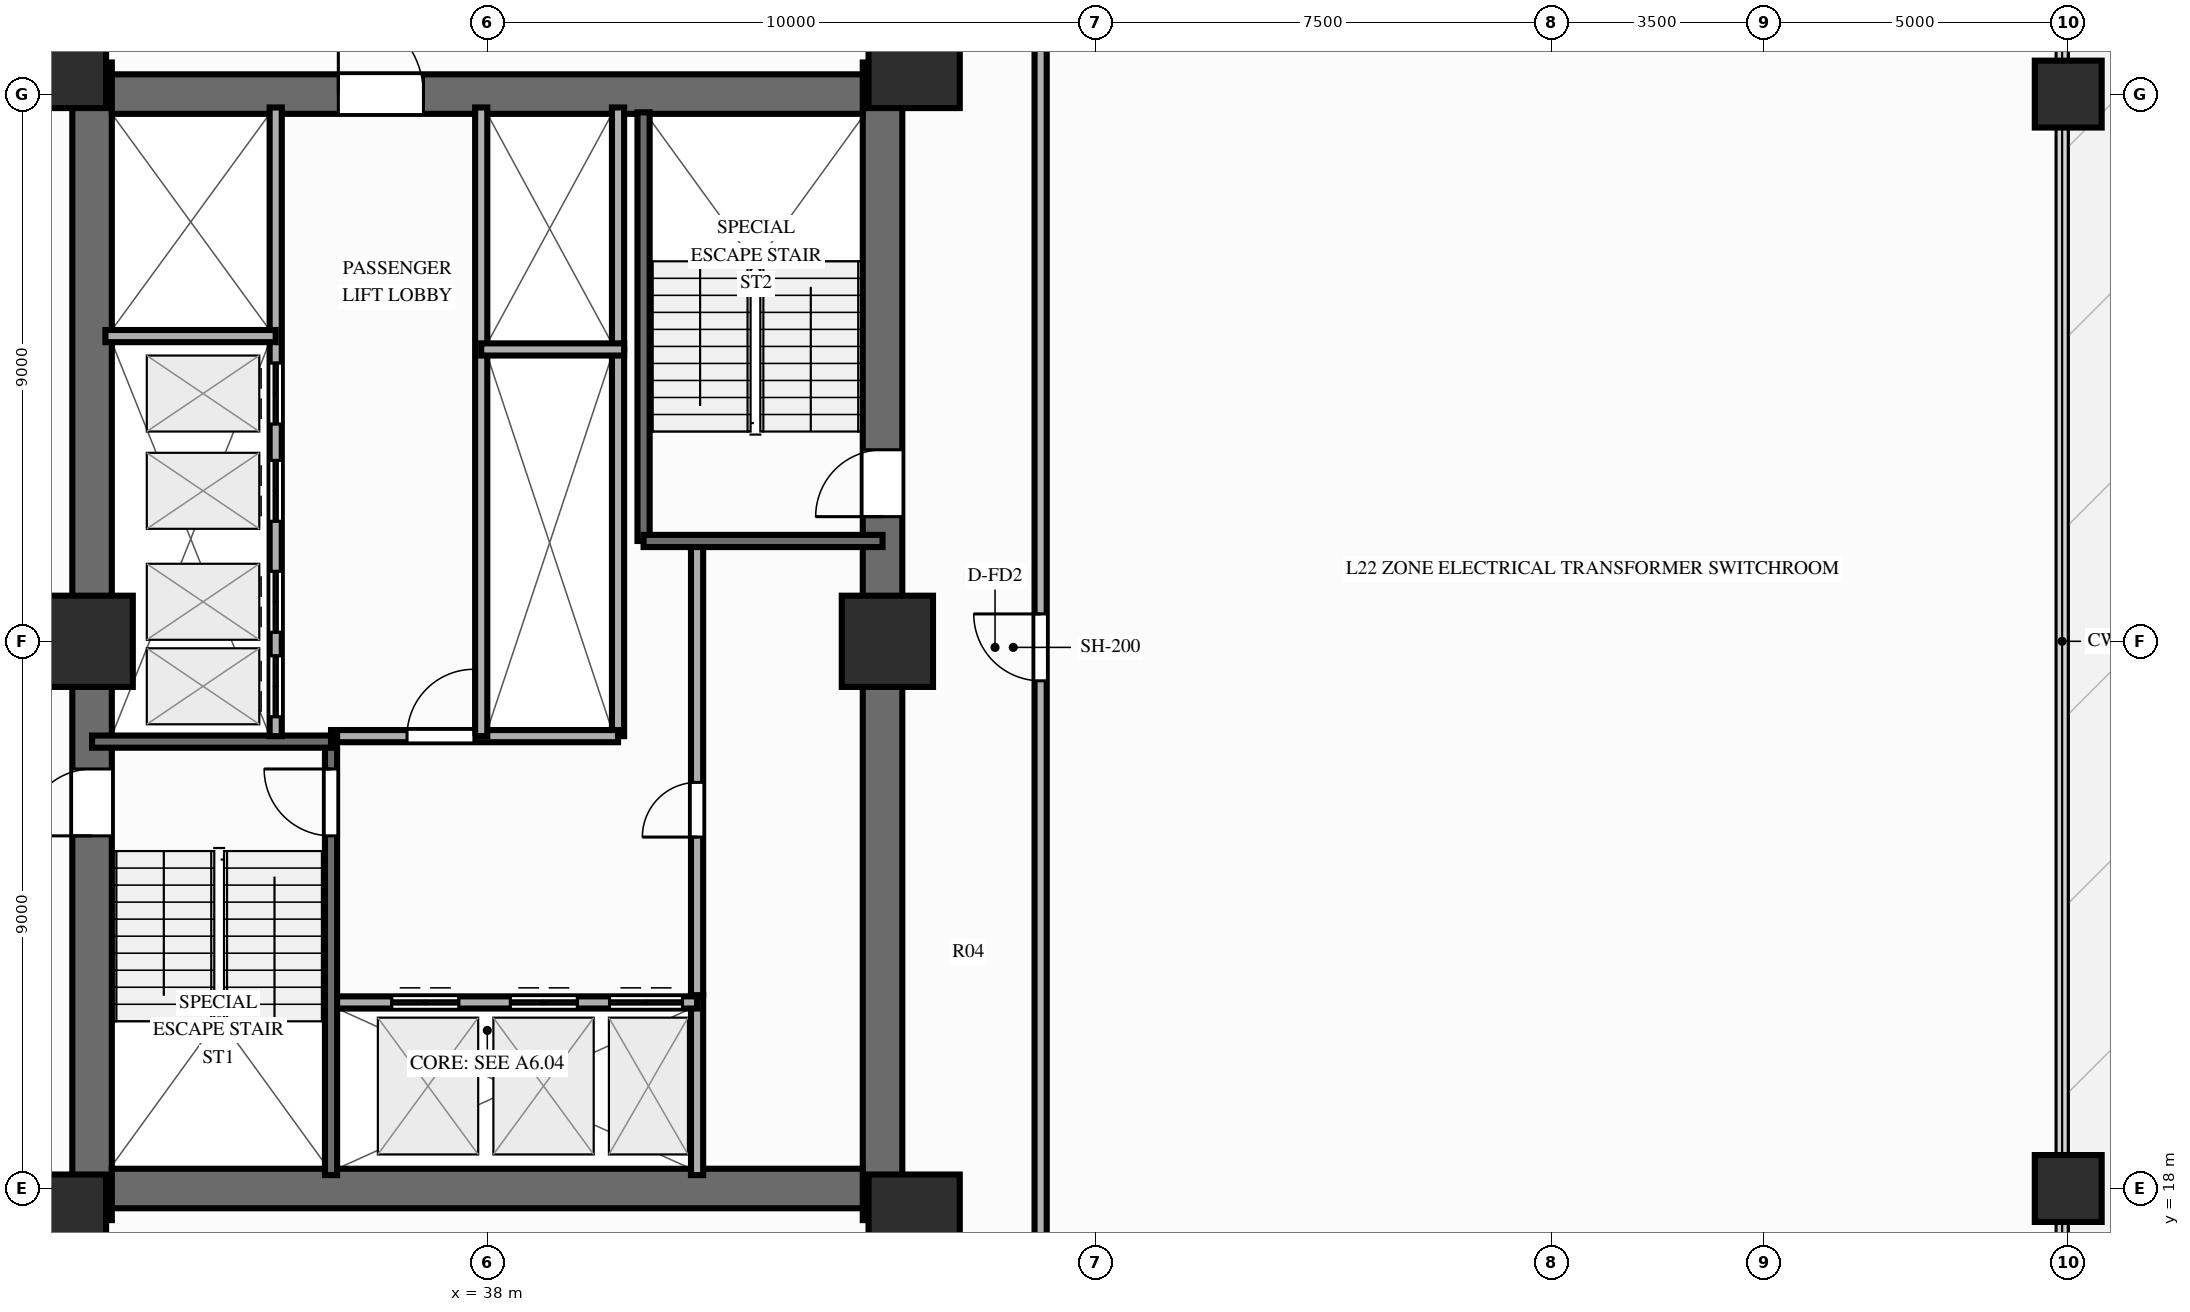
"""IFC4 building model, lengths in metres.
Left out: names, types, materials, properties, quantities, classifications, styles, units other than length and angle.
Written with IfcOpenShell. Run it as: python <this file> out.ifc"""

import sys

from ifc_helpers import new_model, si_unit, direction, frame, frame_2d, origin, origin_2d, place, context, subcontext, project, spatial, rectangle, extrude, source, transform, mapped, element, fill, save


model = new_model("IFC4")
c1 = context("Model", 3, precision=1e-05, world=origin(), true_north=direction((0.0, 1.0)))
c2 = subcontext(c1, "Body", "Model", "MODEL_VIEW")
j1 = project(units=[si_unit("LENGTHUNIT", "METRE"), si_unit("PLANEANGLEUNIT", "RADIAN")], contexts=[c1])
p1 = place(None, origin())
s1 = spatial("IfcSite", under=j1, at=p1, CompositionType="ELEMENT")
p2 = place(p1, origin())
s2 = spatial("IfcBuilding", under=s1, at=p2, CompositionType="ELEMENT")
p3 = place(p2, frame((0.0, 0.0, 70.4)))
s3 = spatial("IfcBuildingStorey", under=s2, at=p3, CompositionType="ELEMENT", Elevation=70.4)
p4 = place(p3, frame((31.5, 17.48, 0.0), z_axis=(0.0, 0.0, 1.0), x_axis=(0.0, 1.0, 0.0)))
e1 = element("IfcWall", 1, at=p4, inside=s3, PredefinedType="SHEAR", context=c2, shape_type="SweptSolid", body=[
    extrude(rectangle(XDim=19.04, YDim=0.65, at=frame_2d((9.52, 0.0))), origin(), (0.0, 0.0, 1.0), 3.95),
])
p5 = place(p4, frame((6.32, 0.0, 0.0)))
e2 = element("IfcOpeningElement", 2, at=p5, cuts=e1, PredefinedType="OPENING", context=c2, shape_type="SweptSolid", body=[
    extrude(rectangle(XDim=1.1, YDim=2.15, at=frame_2d((0.55, 1.075))), frame((0.0, 0.337, 0.0), z_axis=(0.0, -1.0, 0.0), x_axis=(1.0, 0.0, 0.0)), (0.0, 0.0, 1.0), 0.674),
])
p6 = place(p3, frame((44.5, 17.48, 0.0), z_axis=(0.0, 0.0, 1.0), x_axis=(0.0, 1.0, 0.0)))
e3 = element("IfcWall", 3, at=p6, inside=s3, PredefinedType="SHEAR", context=c2, shape_type="SweptSolid", body=[
    extrude(rectangle(XDim=19.04, YDim=0.65, at=frame_2d((9.52, 0.0))), origin(), (0.0, 0.0, 1.0), 3.95),
])
p7 = place(p6, frame((12.67, 0.0, 0.0), z_axis=(0.0, 0.0, 1.0), x_axis=(-1.0, 0.0, 0.0)))
e4 = element("IfcOpeningElement", 4, at=p7, cuts=e3, PredefinedType="OPENING", context=c2, shape_type="SweptSolid", body=[
    extrude(rectangle(XDim=1.1, YDim=2.15, at=frame_2d((0.55, 1.075))), frame((0.0, 0.337, 0.0), z_axis=(0.0, -1.0, 0.0), x_axis=(1.0, 0.0, 0.0)), (0.0, 0.0, 1.0), 0.674),
])
p8 = place(p3, frame((31.825, 18.0, 0.0), z_axis=(0.0, 0.0, 1.0), x_axis=(1.0, 0.0, 0.0)))
e5 = element("IfcWall", 5, at=p8, inside=s3, PredefinedType="SHEAR", context=c2, shape_type="SweptSolid", body=[
    extrude(rectangle(XDim=12.35, YDim=0.65, at=frame_2d((6.175, 0.0))), origin(), (0.0, 0.0, 1.0), 3.95),
])
p9 = place(p3, frame((31.825, 36.0, 0.0), z_axis=(0.0, 0.0, 1.0), x_axis=(1.0, 0.0, 0.0)))
e6 = element("IfcWall", 6, at=p9, inside=s3, PredefinedType="SHEAR", context=c2, shape_type="SweptSolid", body=[
    extrude(rectangle(XDim=12.35, YDim=0.65, at=frame_2d((6.175, 0.0))), origin(), (0.0, 0.0, 1.0), 3.95),
])
p10 = place(p9, frame((5.125, 0.0, 0.0), z_axis=(0.0, 0.0, 1.0), x_axis=(-1.0, 0.0, 0.0)))
e7 = element("IfcOpeningElement", 7, at=p10, cuts=e6, PredefinedType="OPENING", context=c2, shape_type="SweptSolid", body=[
    extrude(rectangle(XDim=1.4, YDim=2.15, at=frame_2d((0.7, 1.075))), frame((0.0, 0.337, 0.0), z_axis=(0.0, -1.0, 0.0), x_axis=(1.0, 0.0, 0.0)), (0.0, 0.0, 1.0), 0.674),
])
m1 = source(origin(), c2, "Body", "SweptSolid", [
    extrude(rectangle(XDim=1.5, YDim=1.5, at=origin_2d()), origin(), (0.0, 0.0, 1.0), 3.95),
])
for number, where, z_axis, x_axis in (
    (8, (30.98, 17.48, 0.0), (0.0, 0.0, 1.0), (1.0, 0.0, 0.0)),
    (9, (45.02, 17.48, 0.0), (0.0, 0.0, 1.0), (1.0, 0.0, 0.0)),
    (10, (30.98, 36.52, 0.0), (0.0, 0.0, 1.0), (1.0, 0.0, 0.0)),
    (11, (45.02, 36.52, 0.0), (0.0, 0.0, 1.0), (1.0, 0.0, 0.0)),
    (12, (31.42, 27.0, 0.0), (0.0, 0.0, 1.0), (1.0, 0.0, 0.0)),
    (13, (44.58, 27.0, 0.0), (0.0, 0.0, 1.0), (1.0, 0.0, 0.0)),
):
    element("IfcColumn", number, at=place(p3, frame(where, z_axis=z_axis, x_axis=x_axis)), inside=s3, PredefinedType="COLUMN", context=c2, shape_type="MappedRepresentation", body=[
        mapped(m1, transform((0.0, 0.0, 0.0), scale=1.0)),
    ])
m2 = source(origin(), c2, "Body", "SweptSolid", [
    extrude(rectangle(XDim=1.1, YDim=1.1, at=origin_2d()), origin(), (0.0, 0.0, 1.0), 3.95),
])
for number, where, z_axis, x_axis in (
    (14, (64.0, 18.0, 0.0), (0.0, 0.0, 1.0), (1.0, 0.0, 0.0)),
    (15, (64.0, 36.0, 0.0), (0.0, 0.0, 1.0), (1.0, 0.0, 0.0)),
):
    element("IfcColumn", number, at=place(p3, frame(where, z_axis=z_axis, x_axis=x_axis)), inside=s3, PredefinedType="COLUMN", context=c2, shape_type="MappedRepresentation", body=[
        mapped(m2, transform((0.0, 0.0, 0.0), scale=1.0)),
    ])
p11 = place(p3, frame((41.45, 18.22, 0.0), z_axis=(0.0, 0.0, 1.0), x_axis=(0.0, 1.0, 0.0)))
e16 = element("IfcWall", 16, at=p11, inside=s3, PredefinedType="PARTITIONING", context=c2, shape_type="SweptSolid", body=[
    extrude(rectangle(XDim=2.96, YDim=0.2, at=frame_2d((1.48, 0.0))), origin(), (0.0, 0.0, 1.0), 3.61),
])
p12 = place(p3, frame((41.45, 21.18, 0.0), z_axis=(0.0, 0.0, 1.0), x_axis=(0.0, 1.0, 0.0)))
e17 = element("IfcWall", 17, at=p12, inside=s3, PredefinedType="PARTITIONING", context=c2, shape_type="SweptSolid", body=[
    extrude(rectangle(XDim=7.42, YDim=0.2, at=frame_2d((3.71, 0.0))), origin(), (0.0, 0.0, 1.0), 3.61),
])
p13 = place(p12, frame((2.6, 0.0, 0.0)))
e18 = element("IfcOpeningElement", 18, at=p13, cuts=e17, PredefinedType="OPENING", context=c2, shape_type="SweptSolid", body=[
    extrude(rectangle(XDim=0.9, YDim=2.1, at=frame_2d((0.45, 1.05))), frame((0.0, 0.112, 0.0), z_axis=(0.0, -1.0, 0.0), x_axis=(1.0, 0.0, 0.0)), (0.0, 0.0, 1.0), 0.224),
])
p14 = place(p3, frame((40.15, 25.44, 0.0), z_axis=(0.0, 0.0, 1.0), x_axis=(0.0, 1.0, 0.0)))
e19 = element("IfcWall", 19, at=p14, inside=s3, PredefinedType="PARTITIONING", context=c2, shape_type="SweptSolid", body=[
    extrude(rectangle(XDim=6.36, YDim=0.2, at=frame_2d((3.18, 0.0))), origin(), (0.0, 0.0, 1.0), 3.61),
])
p15 = place(p3, frame((40.15, 31.8, 0.0), z_axis=(0.0, 0.0, 1.0), x_axis=(0.0, 1.0, 0.0)))
e20 = element("IfcWall", 20, at=p15, inside=s3, PredefinedType="PARTITIONING", context=c2, shape_type="SweptSolid", body=[
    extrude(rectangle(XDim=3.98, YDim=0.2, at=frame_2d((1.99, 0.0))), origin(), (0.0, 0.0, 1.0), 3.61),
])
p16 = place(p3, frame((35.43, 21.06, 0.0), z_axis=(0.0, 0.0, 1.0), x_axis=(1.0, 0.0, 0.0)))
e21 = element("IfcWall", 21, at=p16, inside=s3, PredefinedType="PARTITIONING", context=c2, shape_type="SweptSolid", body=[
    extrude(rectangle(XDim=6.02, YDim=0.2, at=frame_2d((3.01, 0.0))), origin(), (0.0, 0.0, 1.0), 3.61),
])
p17 = place(p16, frame((1.0, 0.0, 0.0)))
e22 = element("IfcOpeningElement", 22, at=p17, cuts=e21, PredefinedType="OPENING", context=c2, shape_type="SweptSolid", body=[
    extrude(rectangle(XDim=1.1, YDim=2.15, at=frame_2d((0.55, 1.075))), frame((0.0, 0.112, 0.0), z_axis=(0.0, -1.0, 0.0), x_axis=(1.0, 0.0, 0.0)), (0.0, 0.0, 1.0), 0.224),
])
p18 = place(p16, frame((2.95, 0.0, 0.0)))
e23 = element("IfcOpeningElement", 23, at=p18, cuts=e21, PredefinedType="OPENING", context=c2, shape_type="SweptSolid", body=[
    extrude(rectangle(XDim=1.1, YDim=2.15, at=frame_2d((0.55, 1.075))), frame((0.0, 0.112, 0.0), z_axis=(0.0, -1.0, 0.0), x_axis=(1.0, 0.0, 0.0)), (0.0, 0.0, 1.0), 0.224),
])
p19 = place(p16, frame((4.58, 0.0, 0.0)))
e24 = element("IfcOpeningElement", 24, at=p19, cuts=e21, PredefinedType="OPENING", context=c2, shape_type="SweptSolid", body=[
    extrude(rectangle(XDim=1.2, YDim=2.15, at=frame_2d((0.6, 1.075))), frame((0.0, 0.112, 0.0), z_axis=(0.0, -1.0, 0.0), x_axis=(1.0, 0.0, 0.0)), (0.0, 0.0, 1.0), 0.224),
])
p20 = place(p3, frame((35.43, 25.44, 0.0), z_axis=(0.0, 0.0, 1.0), x_axis=(1.0, 0.0, 0.0)))
e25 = element("IfcWall", 25, at=p20, inside=s3, PredefinedType="PARTITIONING", context=c2, shape_type="SweptSolid", body=[
    extrude(rectangle(XDim=4.72, YDim=0.2, at=frame_2d((2.36, 0.0))), origin(), (0.0, 0.0, 1.0), 3.61),
])
p21 = place(p20, frame((1.25, 0.0, 0.0)))
e26 = element("IfcOpeningElement", 26, at=p21, cuts=e25, PredefinedType="OPENING", context=c2, shape_type="SweptSolid", body=[
    extrude(rectangle(XDim=1.1, YDim=2.15, at=frame_2d((0.55, 1.075))), frame((0.0, 0.112, 0.0), z_axis=(0.0, -1.0, 0.0), x_axis=(1.0, 0.0, 0.0)), (0.0, 0.0, 1.0), 0.224),
])
p22 = place(p3, frame((35.43, 18.22, 0.0), z_axis=(0.0, 0.0, 1.0), x_axis=(0.0, 1.0, 0.0)))
e27 = element("IfcWall", 27, at=p22, inside=s3, PredefinedType="SOLIDWALL", context=c2, shape_type="SweptSolid", body=[
    extrude(rectangle(XDim=7.22, YDim=0.2, at=frame_2d((3.61, 0.0))), origin(), (0.0, 0.0, 1.0), 3.69),
])
p23 = place(p22, frame((6.68, 0.0, 0.0), z_axis=(0.0, 0.0, 1.0), x_axis=(-1.0, 0.0, 0.0)))
e28 = element("IfcOpeningElement", 28, at=p23, cuts=e27, PredefinedType="OPENING", context=c2, shape_type="SweptSolid", body=[
    extrude(rectangle(XDim=1.1, YDim=2.15, at=frame_2d((0.55, 1.075))), frame((0.0, 0.112, 0.0), z_axis=(0.0, -1.0, 0.0), x_axis=(1.0, 0.0, 0.0)), (0.0, 0.0, 1.0), 0.224),
])
p24 = place(p3, frame((31.5, 25.35, 0.0), z_axis=(0.0, 0.0, 1.0), x_axis=(1.0, 0.0, 0.0)))
e29 = element("IfcWall", 29, at=p24, inside=s3, PredefinedType="SOLIDWALL", context=c2, shape_type="SweptSolid", body=[
    extrude(rectangle(XDim=3.93, YDim=0.2, at=frame_2d((1.965, 0.0))), origin(), (0.0, 0.0, 1.0), 3.69),
])
p25 = place(p3, frame((40.57, 28.65, 0.0), z_axis=(0.0, 0.0, 1.0), x_axis=(0.0, 1.0, 0.0)))
e30 = element("IfcWall", 30, at=p25, inside=s3, PredefinedType="SOLIDWALL", context=c2, shape_type="SweptSolid", body=[
    extrude(rectangle(XDim=7.05, YDim=0.2, at=frame_2d((3.525, 0.0))), origin(), (0.0, 0.0, 1.0), 3.69),
])
p26 = place(p3, frame((40.57, 28.65, 0.0), z_axis=(0.0, 0.0, 1.0), x_axis=(1.0, 0.0, 0.0)))
e31 = element("IfcWall", 31, at=p26, inside=s3, PredefinedType="SOLIDWALL", context=c2, shape_type="SweptSolid", body=[
    extrude(rectangle(XDim=3.93, YDim=0.2, at=frame_2d((1.965, 0.0))), origin(), (0.0, 0.0, 1.0), 3.69),
])
p27 = place(p3, frame((34.52, 25.44, 0.0), z_axis=(0.0, 0.0, 1.0), x_axis=(0.0, 1.0, 0.0)))
e32 = element("IfcWall", 32, at=p27, inside=s3, PredefinedType="PARTITIONING", context=c2, shape_type="SweptSolid", body=[
    extrude(rectangle(XDim=10.34, YDim=0.2, at=frame_2d((5.17, 0.0))), origin(), (0.0, 0.0, 1.0), 3.61),
])
p28 = place(p27, frame((0.32, 0.0, 0.0)))
e33 = element("IfcOpeningElement", 33, at=p28, cuts=e32, PredefinedType="OPENING", context=c2, shape_type="SweptSolid", body=[
    extrude(rectangle(XDim=1.0, YDim=2.15, at=frame_2d((0.5, 1.075))), frame((0.0, 0.112, 0.0), z_axis=(0.0, -1.0, 0.0), x_axis=(1.0, 0.0, 0.0)), (0.0, 0.0, 1.0), 0.224),
])
p29 = place(p27, frame((1.71, 0.0, 0.0)))
e34 = element("IfcOpeningElement", 34, at=p29, cuts=e32, PredefinedType="OPENING", context=c2, shape_type="SweptSolid", body=[
    extrude(rectangle(XDim=1.0, YDim=2.15, at=frame_2d((0.5, 1.075))), frame((0.0, 0.112, 0.0), z_axis=(0.0, -1.0, 0.0), x_axis=(1.0, 0.0, 0.0)), (0.0, 0.0, 1.0), 0.224),
])
p30 = place(p27, frame((3.535, 0.0, 0.0)))
e35 = element("IfcOpeningElement", 35, at=p30, cuts=e32, PredefinedType="OPENING", context=c2, shape_type="SweptSolid", body=[
    extrude(rectangle(XDim=1.0, YDim=2.15, at=frame_2d((0.5, 1.075))), frame((0.0, 0.112, 0.0), z_axis=(0.0, -1.0, 0.0), x_axis=(1.0, 0.0, 0.0)), (0.0, 0.0, 1.0), 0.224),
])
p31 = place(p27, frame((5.135, 0.0, 0.0)))
e36 = element("IfcOpeningElement", 36, at=p31, cuts=e32, PredefinedType="OPENING", context=c2, shape_type="SweptSolid", body=[
    extrude(rectangle(XDim=1.0, YDim=2.15, at=frame_2d((0.5, 1.075))), frame((0.0, 0.112, 0.0), z_axis=(0.0, -1.0, 0.0), x_axis=(1.0, 0.0, 0.0)), (0.0, 0.0, 1.0), 0.224),
])
p32 = place(p3, frame((31.72, 32.02, 0.0), z_axis=(0.0, 0.0, 1.0), x_axis=(1.0, 0.0, 0.0)))
e37 = element("IfcWall", 37, at=p32, inside=s3, PredefinedType="PARTITIONING", context=c2, shape_type="SweptSolid", body=[
    extrude(rectangle(XDim=2.8, YDim=0.2, at=frame_2d((1.4, 0.0))), origin(), (0.0, 0.0, 1.0), 3.61),
])
p33 = place(p3, frame((37.9, 25.44, 0.0), z_axis=(0.0, 0.0, 1.0), x_axis=(0.0, 1.0, 0.0)))
e38 = element("IfcWall", 38, at=p33, inside=s3, PredefinedType="PARTITIONING", context=c2, shape_type="SweptSolid", body=[
    extrude(rectangle(XDim=10.34, YDim=0.2, at=frame_2d((5.17, 0.0))), origin(), (0.0, 0.0, 1.0), 3.61),
])
p34 = place(p3, frame((37.9, 31.8, 0.0), z_axis=(0.0, 0.0, 1.0), x_axis=(1.0, 0.0, 0.0)))
e39 = element("IfcWall", 39, at=p34, inside=s3, PredefinedType="PARTITIONING", context=c2, shape_type="SweptSolid", body=[
    extrude(rectangle(XDim=2.35, YDim=0.2, at=frame_2d((1.175, 0.0))), origin(), (0.0, 0.0, 1.0), 3.61),
])
p35 = place(p3, frame((47.1, 14.5, 0.0), z_axis=(0.0, 0.0, 1.0), x_axis=(0.0, 1.0, 0.0)))
e40 = element("IfcWall", 40, at=p35, inside=s3, PredefinedType="PARTITIONING", context=c2, shape_type="SweptSolid", body=[
    extrude(rectangle(XDim=24.8, YDim=0.2, at=frame_2d((12.4, 0.0))), origin(), (0.0, 0.0, 1.0), 3.61),
])
p36 = place(p35, frame((11.85, 0.0, 0.0)))
e41 = element("IfcOpeningElement", 41, at=p36, cuts=e40, PredefinedType="OPENING", context=c2, shape_type="SweptSolid", body=[
    extrude(rectangle(XDim=1.1, YDim=2.15, at=frame_2d((0.55, 1.075))), frame((0.0, 0.112, 0.0), z_axis=(0.0, -1.0, 0.0), x_axis=(1.0, 0.0, 0.0)), (0.0, 0.0, 1.0), 0.224),
])
m3 = source(origin(), c2, "Body", "SweptSolid", [
    extrude(rectangle(XDim=1.1, YDim=2.15, at=frame_2d((0.55, 1.075))), frame((0.0, 0.025, 0.0), z_axis=(0.0, -1.0, 0.0), x_axis=(1.0, 0.0, 0.0)), (0.0, 0.0, 1.0), 0.05),
])
p37 = place(p5, origin())
e42 = element("IfcDoor", 42, at=p37, inside=s3, OperationType="SINGLE_SWING_LEFT", PredefinedType="DOOR", context=c2, shape_type="MappedRepresentation", body=[
    mapped(m3, transform((0.0, 0.0, 0.0), scale=1.0)),
])
fill(e2, e42)
p38 = place(p7, origin())
e43 = element("IfcDoor", 43, at=p38, inside=s3, OperationType="SINGLE_SWING_RIGHT", PredefinedType="DOOR", context=c2, shape_type="MappedRepresentation", body=[
    mapped(m3, transform((0.0, 0.0, 0.0), scale=1.0)),
])
fill(e4, e43)
m4 = source(origin(), c2, "Body", "SweptSolid", [
    extrude(rectangle(XDim=1.4, YDim=2.15, at=frame_2d((0.7, 1.075))), frame((0.0, 0.025, 0.0), z_axis=(0.0, -1.0, 0.0), x_axis=(1.0, 0.0, 0.0)), (0.0, 0.0, 1.0), 0.05),
])
p39 = place(p10, origin())
e44 = element("IfcDoor", 44, at=p39, inside=s3, OperationType="SINGLE_SWING_RIGHT", PredefinedType="DOOR", context=c2, shape_type="MappedRepresentation", body=[
    mapped(m4, transform((0.0, 0.0, 0.0), scale=1.0)),
])
fill(e7, e44)
m5 = source(origin(), c2, "Body", "SweptSolid", [
    extrude(rectangle(XDim=0.9, YDim=2.1, at=frame_2d((0.45, 1.05))), frame((0.0, 0.025, 0.0), z_axis=(0.0, -1.0, 0.0), x_axis=(1.0, 0.0, 0.0)), (0.0, 0.0, 1.0), 0.05),
])
p40 = place(p13, origin())
e45 = element("IfcDoor", 45, at=p40, inside=s3, OperationType="SINGLE_SWING_LEFT", PredefinedType="DOOR", context=c2, shape_type="MappedRepresentation", body=[
    mapped(m5, transform((0.0, 0.0, 0.0), scale=1.0)),
])
fill(e18, e45)
p41 = place(p17, origin())
e46 = element("IfcDoor", 46, at=p41, inside=s3, OperationType="DOUBLE_DOOR_SLIDING", PredefinedType="DOOR", context=c2, shape_type="MappedRepresentation", body=[
    mapped(m3, transform((0.0, 0.0, 0.0), scale=1.0)),
])
fill(e22, e46)
p42 = place(p18, origin())
e47 = element("IfcDoor", 47, at=p42, inside=s3, OperationType="DOUBLE_DOOR_SLIDING", PredefinedType="DOOR", context=c2, shape_type="MappedRepresentation", body=[
    mapped(m3, transform((0.0, 0.0, 0.0), scale=1.0)),
])
fill(e23, e47)
m6 = source(origin(), c2, "Body", "SweptSolid", [
    extrude(rectangle(XDim=1.2, YDim=2.15, at=frame_2d((0.6, 1.075))), frame((0.0, 0.025, 0.0), z_axis=(0.0, -1.0, 0.0), x_axis=(1.0, 0.0, 0.0)), (0.0, 0.0, 1.0), 0.05),
])
p43 = place(p19, origin())
e48 = element("IfcDoor", 48, at=p43, inside=s3, OperationType="DOUBLE_DOOR_SLIDING", PredefinedType="DOOR", context=c2, shape_type="MappedRepresentation", body=[
    mapped(m6, transform((0.0, 0.0, 0.0), scale=1.0)),
])
fill(e24, e48)
p44 = place(p21, origin())
e49 = element("IfcDoor", 49, at=p44, inside=s3, OperationType="SINGLE_SWING_RIGHT", PredefinedType="DOOR", context=c2, shape_type="MappedRepresentation", body=[
    mapped(m3, transform((0.0, 0.0, 0.0), scale=1.0)),
])
fill(e26, e49)
p45 = place(p23, origin())
e50 = element("IfcDoor", 50, at=p45, inside=s3, OperationType="SINGLE_SWING_LEFT", PredefinedType="DOOR", context=c2, shape_type="MappedRepresentation", body=[
    mapped(m3, transform((0.0, 0.0, 0.0), scale=1.0)),
])
fill(e28, e50)
m7 = source(origin(), c2, "Body", "SweptSolid", [
    extrude(rectangle(XDim=1.0, YDim=2.15, at=frame_2d((0.5, 1.075))), frame((0.0, 0.025, 0.0), z_axis=(0.0, -1.0, 0.0), x_axis=(1.0, 0.0, 0.0)), (0.0, 0.0, 1.0), 0.05),
])
p46 = place(p28, origin())
e51 = element("IfcDoor", 51, at=p46, inside=s3, OperationType="DOUBLE_DOOR_SLIDING", PredefinedType="DOOR", context=c2, shape_type="MappedRepresentation", body=[
    mapped(m7, transform((0.0, 0.0, 0.0), scale=1.0)),
])
fill(e33, e51)
p47 = place(p29, origin())
e52 = element("IfcDoor", 52, at=p47, inside=s3, OperationType="DOUBLE_DOOR_SLIDING", PredefinedType="DOOR", context=c2, shape_type="MappedRepresentation", body=[
    mapped(m7, transform((0.0, 0.0, 0.0), scale=1.0)),
])
fill(e34, e52)
p48 = place(p30, origin())
e53 = element("IfcDoor", 53, at=p48, inside=s3, OperationType="DOUBLE_DOOR_SLIDING", PredefinedType="DOOR", context=c2, shape_type="MappedRepresentation", body=[
    mapped(m7, transform((0.0, 0.0, 0.0), scale=1.0)),
])
fill(e35, e53)
p49 = place(p31, origin())
e54 = element("IfcDoor", 54, at=p49, inside=s3, OperationType="DOUBLE_DOOR_SLIDING", PredefinedType="DOOR", context=c2, shape_type="MappedRepresentation", body=[
    mapped(m7, transform((0.0, 0.0, 0.0), scale=1.0)),
])
fill(e36, e54)
p50 = place(p36, origin())
e55 = element("IfcDoor", 55, at=p50, inside=s3, OperationType="SINGLE_SWING_RIGHT", PredefinedType="DOOR", context=c2, shape_type="MappedRepresentation", body=[
    mapped(m3, transform((0.0, 0.0, 0.0), scale=1.0)),
])
fill(e41, e55)
save(model, sys.argv[1])
